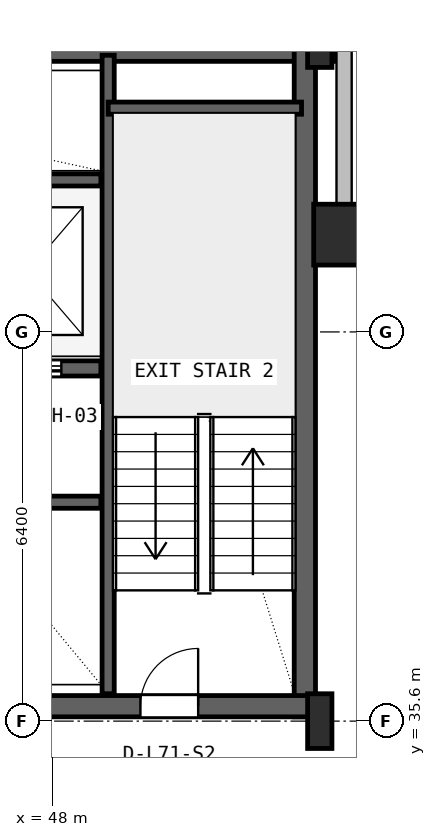
"""IFC4 building model, lengths in metres.
Left out: names, types, materials, properties, quantities, classifications, styles, units other than length and angle.
Written with IfcOpenShell. Run it as: python <this file> out.ifc"""

import sys

from ifc_helpers import new_model, si_unit, direction, frame, frame_2d, origin, origin_2d, place, context, subcontext, project, spatial, rectangle, hollow_rectangle, i_section, extrude, source, transform, mapped, element, fill, save


model = new_model("IFC4")
c1 = context("Model", 3, precision=1e-05, world=origin(), true_north=direction((0.0, 1.0)))
c2 = subcontext(c1, "Body", "Model", "MODEL_VIEW")
j1 = project(units=[si_unit("LENGTHUNIT", "METRE"), si_unit("PLANEANGLEUNIT", "RADIAN")], contexts=[c1])
p1 = place(None, origin())
s1 = spatial("IfcSite", under=j1, at=p1, CompositionType="ELEMENT")
p2 = place(p1, origin())
s2 = spatial("IfcBuilding", under=s1, at=p2, CompositionType="ELEMENT")
p3 = place(p2, frame((0.0, 0.0, 285.0)))
s3 = spatial("IfcBuildingStorey", under=s2, at=p3, CompositionType="ELEMENT", Elevation=285.0)
p4 = place(p3, frame((15.325, 46.625, 0.0), z_axis=(0.0, 0.0, 1.0), x_axis=(1.0, 0.0, 0.0)))
e1 = element("IfcWall", 1, at=p4, inside=s3, PredefinedType="SHEAR", context=c2, shape_type="SweptSolid", body=[
    extrude(rectangle(XDim=37.35, YDim=0.35, at=frame_2d((18.675, 0.0))), origin(), (0.0, 0.0, 1.0), 3.55),
])
p5 = place(p3, frame((52.155, 35.67, 0.0), z_axis=(0.0, 0.0, 1.0), x_axis=(0.0, 1.0, 0.0)))
e2 = element("IfcWall", 2, at=p5, inside=s3, PredefinedType="SHEAR", context=c2, shape_type="SweptSolid", body=[
    extrude(rectangle(XDim=11.13, YDim=0.35, at=frame_2d((5.565, 0.0))), origin(), (0.0, 0.0, 1.0), 3.55),
])
p6 = place(p3, frame((43.2, 35.845, 0.0), z_axis=(0.0, 0.0, 1.0), x_axis=(1.0, 0.0, 0.0)))
e3 = element("IfcWall", 3, at=p6, inside=s3, PredefinedType="SHEAR", context=c2, shape_type="SweptSolid", body=[
    extrude(rectangle(XDim=9.13, YDim=0.35, at=frame_2d((4.565, 0.0))), origin(), (0.0, 0.0, 1.0), 3.55),
])
p7 = place(p6, frame((6.25, 0.0, 0.0)))
e4 = element("IfcOpeningElement", 4, at=p7, cuts=e3, PredefinedType="OPENING", context=c2, shape_type="SweptSolid", body=[
    extrude(rectangle(XDim=0.95, YDim=2.1, at=frame_2d((0.475, 1.05))), frame((0.0, 0.185, 0.0), z_axis=(0.0, -1.0, 0.0), x_axis=(1.0, 0.0, 0.0)), (0.0, 0.0, 1.0), 0.37),
])
m1 = source(origin(), c2, "Body", "SweptSolid", [
    extrude(i_section(OverallWidth=0.4, OverallDepth=0.9, WebThickness=0.016, FlangeThickness=0.028, FilletRadius=0.016, at=origin_2d()), origin(), (0.0, 0.0, 1.0), 3.8),
])
for number, where, z_axis, x_axis in (
    (5, (52.4, 35.6, 0.0), (0.0, 0.0, 1.0), (1.0, 0.0, 0.0)),
    (6, (52.4, 46.8, 0.0), (0.0, 0.0, 1.0), (1.0, 0.0, 0.0)),
):
    element("IfcColumn", number, at=place(p3, frame(where, z_axis=z_axis, x_axis=x_axis)), inside=s3, PredefinedType="COLUMN", context=c2, shape_type="MappedRepresentation", body=[
        mapped(m1, transform((0.0, 0.0, 0.0), x_axis=(1.0, 0.0, 0.0), y_axis=(0.0, 1.0, 0.0), z_axis=(0.0, 0.0, 1.0), scale=1.0)),
    ])
m2 = source(origin(), c2, "Body", "SweptSolid", [
    extrude(hollow_rectangle(XDim=1.0, YDim=1.0, WallThickness=0.04, at=origin_2d()), origin(), (0.0, 0.0, 1.0), 3.8),
])
p8 = place(p3, frame((52.8, 43.6, 0.0), z_axis=(0.0, 0.0, 1.0), x_axis=(1.0, 0.0, 0.0)))
e7 = element("IfcColumn", 7, at=p8, inside=s3, PredefinedType="COLUMN", context=c2, shape_type="MappedRepresentation", body=[
    mapped(m2, transform((0.0, 0.0, 0.0), x_axis=(1.0, 0.0, 0.0), y_axis=(0.0, 1.0, 0.0), z_axis=(0.0, 0.0, 1.0), scale=1.0)),
])
p9 = place(p3, frame((52.93, 43.6, 0.0), z_axis=(0.0, 0.0, 1.0), x_axis=(1.0, 0.0, 0.0)))
e8 = element("IfcWall", 8, at=p9, inside=s3, PredefinedType="SOLIDWALL", context=c2, shape_type="SweptSolid", body=[
    extrude(rectangle(XDim=2.99, YDim=0.25, at=frame_2d((1.495, 0.0))), origin(), (0.0, 0.0, 1.0), 3.53),
])
p10 = place(p3, frame((52.8, 43.52, 0.0), z_axis=(0.0, 0.0, 1.0), x_axis=(0.0, 1.0, 0.0)))
e9 = element("IfcWall", 9, at=p10, inside=s3, PredefinedType="SOLIDWALL", context=c2, shape_type="SweptSolid", body=[
    extrude(rectangle(XDim=3.2, YDim=0.25, at=frame_2d((1.6, 0.0))), origin(), (0.0, 0.0, 1.0), 3.171),
])
p11 = place(p3, frame((48.92, 36.05, 0.0), z_axis=(0.0, 0.0, 1.0), x_axis=(0.0, 1.0, 0.0)))
e10 = element("IfcWall", 10, at=p11, inside=s3, PredefinedType="SHEAR", context=c2, shape_type="SweptSolid", body=[
    extrude(rectangle(XDim=10.5, YDim=0.2, at=frame_2d((5.25, 0.0))), origin(), (0.0, 0.0, 1.0), 3.55),
])
p12 = place(p3, frame((48.92, 45.68, 0.0), z_axis=(0.0, 0.0, 1.0), x_axis=(1.0, 0.0, 0.0)))
e11 = element("IfcWall", 11, at=p12, inside=s3, PredefinedType="SHEAR", context=c2, shape_type="SweptSolid", body=[
    extrude(rectangle(XDim=3.18, YDim=0.2, at=frame_2d((1.59, 0.0))), origin(), (0.0, 0.0, 1.0), 3.55),
])
p13 = place(p3, frame((24.98, 41.4, 0.0), z_axis=(0.0, 0.0, 1.0), x_axis=(1.0, 0.0, 0.0)))
e12 = element("IfcWall", 12, at=p13, inside=s3, PredefinedType="SHEAR", context=c2, shape_type="SweptSolid", body=[
    extrude(rectangle(XDim=23.82, YDim=0.25, at=frame_2d((11.91, 0.0))), origin(), (0.0, 0.0, 1.0), 3.55),
])
p14 = place(p13, frame((16.87, 0.0, 0.0)))
e13 = element("IfcOpeningElement", 13, at=p14, cuts=e12, PredefinedType="OPENING", context=c2, shape_type="SweptSolid", body=[
    extrude(rectangle(XDim=1.1, YDim=2.18, at=frame_2d((0.55, 1.09))), frame((0.0, 0.135, 0.0), z_axis=(0.0, -1.0, 0.0), x_axis=(1.0, 0.0, 0.0)), (0.0, 0.0, 1.0), 0.27),
])
p15 = place(p13, frame((19.47, 0.0, 0.0)))
e14 = element("IfcOpeningElement", 14, at=p15, cuts=e12, PredefinedType="OPENING", context=c2, shape_type="SweptSolid", body=[
    extrude(rectangle(XDim=1.1, YDim=2.18, at=frame_2d((0.55, 1.09))), frame((0.0, 0.135, 0.0), z_axis=(0.0, -1.0, 0.0), x_axis=(1.0, 0.0, 0.0)), (0.0, 0.0, 1.0), 0.27),
])
p16 = place(p13, frame((22.07, 0.0, 0.0)))
e15 = element("IfcOpeningElement", 15, at=p16, cuts=e12, PredefinedType="OPENING", context=c2, shape_type="SweptSolid", body=[
    extrude(rectangle(XDim=1.1, YDim=2.18, at=frame_2d((0.55, 1.09))), frame((0.0, 0.135, 0.0), z_axis=(0.0, -1.0, 0.0), x_axis=(1.0, 0.0, 0.0)), (0.0, 0.0, 1.0), 0.27),
])
p17 = place(p13, frame((0.96, 0.0, 0.0)))
e16 = element("IfcOpeningElement", 16, at=p17, cuts=e12, PredefinedType="OPENING", context=c2, shape_type="SweptSolid", body=[
    extrude(rectangle(XDim=1.0, YDim=2.08, at=frame_2d((0.5, 1.04))), frame((0.0, 0.135, 0.0), z_axis=(0.0, -1.0, 0.0), x_axis=(1.0, 0.0, 0.0)), (0.0, 0.0, 1.0), 0.27),
])
p18 = place(p13, frame((3.56, 0.0, 0.0)))
e17 = element("IfcOpeningElement", 17, at=p18, cuts=e12, PredefinedType="OPENING", context=c2, shape_type="SweptSolid", body=[
    extrude(rectangle(XDim=1.0, YDim=2.08, at=frame_2d((0.5, 1.04))), frame((0.0, 0.135, 0.0), z_axis=(0.0, -1.0, 0.0), x_axis=(1.0, 0.0, 0.0)), (0.0, 0.0, 1.0), 0.27),
])
p19 = place(p13, frame((6.16, 0.0, 0.0)))
e18 = element("IfcOpeningElement", 18, at=p19, cuts=e12, PredefinedType="OPENING", context=c2, shape_type="SweptSolid", body=[
    extrude(rectangle(XDim=0.92, YDim=2.08, at=frame_2d((0.46, 1.04))), frame((0.0, 0.135, 0.0), z_axis=(0.0, -1.0, 0.0), x_axis=(1.0, 0.0, 0.0)), (0.0, 0.0, 1.0), 0.27),
])
p20 = place(p13, frame((11.56, 0.0, 0.0)))
e19 = element("IfcOpeningElement", 19, at=p20, cuts=e12, PredefinedType="OPENING", context=c2, shape_type="SweptSolid", body=[
    extrude(rectangle(XDim=1.0, YDim=2.08, at=frame_2d((0.5, 1.04))), frame((0.0, 0.135, 0.0), z_axis=(0.0, -1.0, 0.0), x_axis=(1.0, 0.0, 0.0)), (0.0, 0.0, 1.0), 0.27),
])
p21 = place(p3, frame((41.22, 44.5, 0.0), z_axis=(0.0, 0.0, 1.0), x_axis=(1.0, 0.0, 0.0)))
e20 = element("IfcWall", 20, at=p21, inside=s3, PredefinedType="SHEAR", context=c2, shape_type="SweptSolid", body=[
    extrude(rectangle(XDim=7.58, YDim=0.2, at=frame_2d((3.79, 0.0))), origin(), (0.0, 0.0, 1.0), 3.55),
])
p22 = place(p3, frame((43.65, 39.2, 0.0), z_axis=(0.0, 0.0, 1.0), x_axis=(1.0, 0.0, 0.0)))
e21 = element("IfcWall", 21, at=p22, inside=s3, PredefinedType="SHEAR", context=c2, shape_type="SweptSolid", body=[
    extrude(rectangle(XDim=5.15, YDim=0.2, at=frame_2d((2.575, 0.0))), origin(), (0.0, 0.0, 1.0), 3.55),
])
m3 = source(origin(), c2, "Body", "SweptSolid", [
    extrude(rectangle(XDim=0.95, YDim=2.1, at=frame_2d((0.475, 1.05))), frame((0.0, 0.025, 0.0), z_axis=(0.0, -1.0, 0.0), x_axis=(1.0, 0.0, 0.0)), (0.0, 0.0, 1.0), 0.05),
])
p23 = place(p7, origin())
e22 = element("IfcDoor", 22, at=p23, inside=s3, OperationType="SINGLE_SWING_RIGHT", PredefinedType="DOOR", context=c2, shape_type="MappedRepresentation", body=[
    mapped(m3, transform((0.0, 0.0, 0.0), x_axis=(1.0, 0.0, 0.0), y_axis=(0.0, 1.0, 0.0), z_axis=(0.0, 0.0, 1.0), scale=1.0)),
])
fill(e4, e22)
m4 = source(origin(), c2, "Body", "SweptSolid", [
    extrude(rectangle(XDim=1.1, YDim=2.18, at=frame_2d((0.55, 1.09))), frame((0.0, 0.025, 0.0), z_axis=(0.0, -1.0, 0.0), x_axis=(1.0, 0.0, 0.0)), (0.0, 0.0, 1.0), 0.05),
])
p24 = place(p16, frame((1.1, 0.0, 0.0), z_axis=(0.0, 0.0, 1.0), x_axis=(-1.0, 0.0, 0.0)))
e23 = element("IfcDoor", 23, at=p24, inside=s3, OperationType="SLIDING_TO_LEFT", PredefinedType="DOOR", context=c2, shape_type="MappedRepresentation", body=[
    mapped(m4, transform((0.0, 0.0, 0.0), x_axis=(1.0, 0.0, 0.0), y_axis=(0.0, 1.0, 0.0), z_axis=(0.0, 0.0, 1.0), scale=1.0)),
])
fill(e15, e23)
save(model, sys.argv[1])
